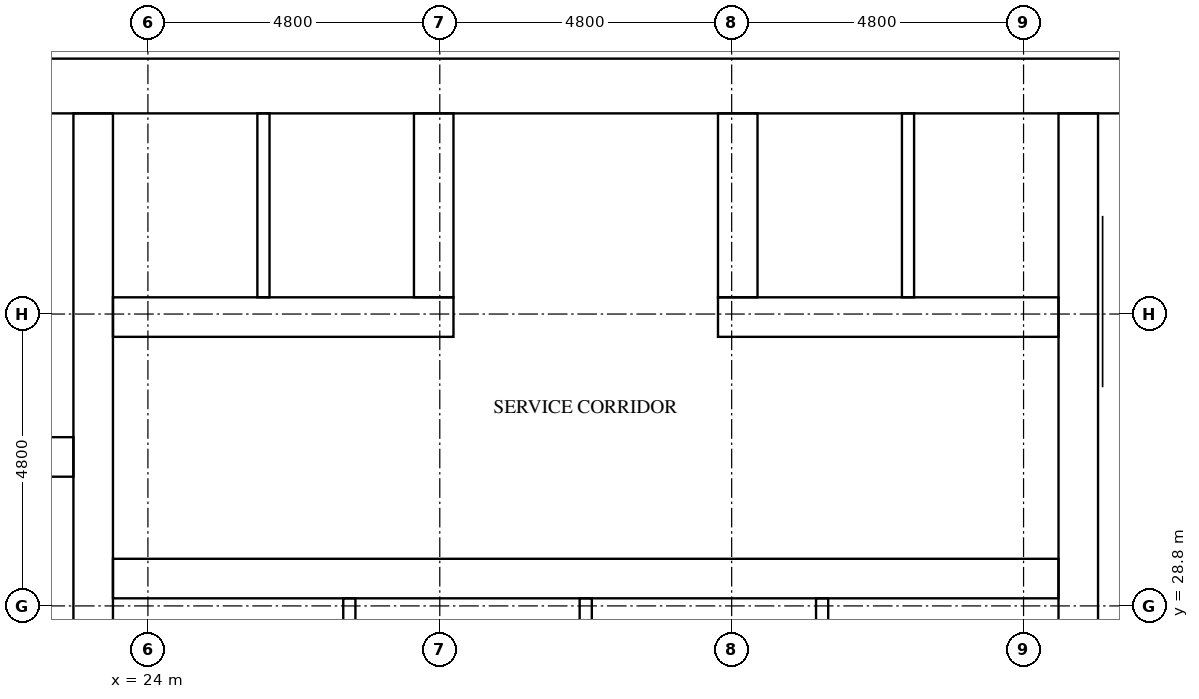
"""IFC4 building model, lengths in metres.
Left out: names, types, materials, properties, quantities, classifications, styles, units other than length and angle.
Written with IfcOpenShell. Run it as: python <this file> out.ifc"""

import sys

from ifc_helpers import new_model, si_unit, direction, frame, frame_2d, origin, place, context, subcontext, project, spatial, rectangle, extrude, element, fill, save


model = new_model("IFC4")
c1 = context("Model", 3, precision=1e-05, world=origin(), true_north=direction((0.0, 1.0)))
c2 = subcontext(c1, "Body", "Model", "MODEL_VIEW")
j1 = project(units=[si_unit("LENGTHUNIT", "METRE"), si_unit("PLANEANGLEUNIT", "RADIAN")], contexts=[c1])
p1 = place(None, origin())
s1 = spatial("IfcSite", under=j1, at=p1, CompositionType="ELEMENT")
p2 = place(p1, origin())
s2 = spatial("IfcBuilding", under=s1, at=p2, CompositionType="ELEMENT")
p3 = place(p2, frame((0.0, 0.0, 103.2)))
s3 = spatial("IfcBuildingStorey", under=s2, at=p3, CompositionType="ELEMENT", Elevation=103.2)
p4 = place(p3, frame((15.0, 37.35, 0.0), z_axis=(0.0, 0.0, 1.0), x_axis=(1.0, 0.0, 0.0)))
e1 = element("IfcWall", 1, at=p4, inside=s3, PredefinedType="SHEAR", context=c2, shape_type="SweptSolid", body=[
    extrude(rectangle(XDim=32.4, YDim=0.9, at=frame_2d((16.2, 0.0))), origin(), (0.0, 0.0, 1.0), 3.2),
])
p5 = place(p4, frame((15.3, 0.0, 0.0)))
e2 = element("IfcOpeningElement", 2, at=p5, cuts=e1, PredefinedType="OPENING", context=c2, shape_type="SweptSolid", body=[
    extrude(rectangle(XDim=1.8, YDim=2.1, at=frame_2d((0.9, 1.05))), frame((0.0, 0.46, 0.0), z_axis=(0.0, -1.0, 0.0), x_axis=(1.0, 0.0, 0.0)), (0.0, 0.0, 1.0), 0.92),
])
p6 = place(p4, frame((1.794, 0.0, 0.0)))
e3 = element("IfcOpeningElement", 3, at=p6, cuts=e1, PredefinedType="OPENING", context=c2, shape_type="SweptSolid", body=[
    extrude(rectangle(XDim=1.0, YDim=2.1, at=frame_2d((0.5, 1.05))), frame((0.0, 0.46, 0.0), z_axis=(0.0, -1.0, 0.0), x_axis=(1.0, 0.0, 0.0)), (0.0, 0.0, 1.0), 0.92),
])
p7 = place(p4, frame((5.331, 0.0, 0.0)))
e4 = element("IfcOpeningElement", 4, at=p7, cuts=e1, PredefinedType="OPENING", context=c2, shape_type="SweptSolid", body=[
    extrude(rectangle(XDim=1.0, YDim=2.1, at=frame_2d((0.5, 1.05))), frame((0.0, 0.46, 0.0), z_axis=(0.0, -1.0, 0.0), x_axis=(1.0, 0.0, 0.0)), (0.0, 0.0, 1.0), 0.92),
])
p8 = place(p3, frame((23.1, 15.9, 0.0), z_axis=(0.0, 0.0, 1.0), x_axis=(0.0, 1.0, 0.0)))
e5 = element("IfcWall", 5, at=p8, inside=s3, PredefinedType="SHEAR", context=c2, shape_type="SweptSolid", body=[
    extrude(rectangle(XDim=21.0, YDim=0.65, at=frame_2d((10.5, 0.0))), origin(), (0.0, 0.0, 1.0), 3.2),
])
p9 = place(p3, frame((39.3, 27.75, 0.0), z_axis=(0.0, 0.0, 1.0), x_axis=(0.0, 1.0, 0.0)))
e6 = element("IfcWall", 6, at=p9, inside=s3, PredefinedType="SHEAR", context=c2, shape_type="SweptSolid", body=[
    extrude(rectangle(XDim=9.15, YDim=0.65, at=frame_2d((4.575, 0.0))), origin(), (0.0, 0.0, 1.0), 3.2),
])
p10 = place(p3, frame((15.9, 31.25, 0.0), z_axis=(0.0, 0.0, 1.0), x_axis=(1.0, 0.0, 0.0)))
e7 = element("IfcWall", 7, at=p10, inside=s3, PredefinedType="SHEAR", context=c2, shape_type="SweptSolid", body=[
    extrude(rectangle(XDim=6.875, YDim=0.65, at=frame_2d((3.438, 0.0))), origin(), (0.0, 0.0, 1.0), 3.2),
])
p11 = place(p3, frame((23.425, 29.25, 0.0), z_axis=(0.0, 0.0, 1.0), x_axis=(1.0, 0.0, 0.0)))
e8 = element("IfcWall", 8, at=p11, inside=s3, PredefinedType="SHEAR", context=c2, shape_type="SweptSolid", body=[
    extrude(rectangle(XDim=15.55, YDim=0.65, at=frame_2d((7.775, 0.0))), origin(), (0.0, 0.0, 1.0), 3.2),
])
p12 = place(p11, frame((1.394, 0.0, 0.0)))
e9 = element("IfcOpeningElement", 9, at=p12, cuts=e8, PredefinedType="OPENING", context=c2, shape_type="SweptSolid", body=[
    extrude(rectangle(XDim=1.0, YDim=2.1, at=frame_2d((0.5, 1.05))), frame((0.0, 0.335, 0.0), z_axis=(0.0, -1.0, 0.0), x_axis=(1.0, 0.0, 0.0)), (0.0, 0.0, 1.0), 0.67),
])
p13 = place(p11, frame((5.331, 0.0, 0.0)))
e10 = element("IfcOpeningElement", 10, at=p13, cuts=e8, PredefinedType="OPENING", context=c2, shape_type="SweptSolid", body=[
    extrude(rectangle(XDim=1.0, YDim=2.1, at=frame_2d((0.5, 1.05))), frame((0.0, 0.335, 0.0), z_axis=(0.0, -1.0, 0.0), x_axis=(1.0, 0.0, 0.0)), (0.0, 0.0, 1.0), 0.67),
])
p14 = place(p11, frame((9.219, 0.0, 0.0)))
e11 = element("IfcOpeningElement", 11, at=p14, cuts=e8, PredefinedType="OPENING", context=c2, shape_type="SweptSolid", body=[
    extrude(rectangle(XDim=1.0, YDim=2.1, at=frame_2d((0.5, 1.05))), frame((0.0, 0.335, 0.0), z_axis=(0.0, -1.0, 0.0), x_axis=(1.0, 0.0, 0.0)), (0.0, 0.0, 1.0), 0.67),
])
p15 = place(p11, frame((13.156, 0.0, 0.0)))
e12 = element("IfcOpeningElement", 12, at=p15, cuts=e8, PredefinedType="OPENING", context=c2, shape_type="SweptSolid", body=[
    extrude(rectangle(XDim=1.0, YDim=2.1, at=frame_2d((0.5, 1.05))), frame((0.0, 0.335, 0.0), z_axis=(0.0, -1.0, 0.0), x_axis=(1.0, 0.0, 0.0)), (0.0, 0.0, 1.0), 0.67),
])
p16 = place(p3, frame((23.425, 33.55, 0.0), z_axis=(0.0, 0.0, 1.0), x_axis=(1.0, 0.0, 0.0)))
e13 = element("IfcWall", 13, at=p16, inside=s3, PredefinedType="SHEAR", context=c2, shape_type="SweptSolid", body=[
    extrude(rectangle(XDim=5.6, YDim=0.65, at=frame_2d((2.8, 0.0))), origin(), (0.0, 0.0, 1.0), 3.2),
])
p17 = place(p3, frame((33.375, 33.55, 0.0), z_axis=(0.0, 0.0, 1.0), x_axis=(1.0, 0.0, 0.0)))
e14 = element("IfcWall", 14, at=p17, inside=s3, PredefinedType="SHEAR", context=c2, shape_type="SweptSolid", body=[
    extrude(rectangle(XDim=5.6, YDim=0.65, at=frame_2d((2.8, 0.0))), origin(), (0.0, 0.0, 1.0), 3.2),
])
for number, where, z_axis, x_axis in (
    (15, (28.7, 33.875, 0.0), (0.0, 0.0, 1.0), (0.0, 1.0, 0.0)),
    (16, (33.7, 33.875, 0.0), (0.0, 0.0, 1.0), (0.0, 1.0, 0.0)),
):
    element("IfcWall", number, at=place(p3, frame(where, z_axis=z_axis, x_axis=x_axis)), inside=s3, PredefinedType="SHEAR", context=c2, shape_type="SweptSolid", body=[
        extrude(rectangle(XDim=3.025, YDim=0.65, at=frame_2d((1.512, 0.0))), origin(), (0.0, 0.0, 1.0), 3.2),
    ])
for number, where, z_axis, x_axis in (
    (17, (25.9, 33.875, 0.0), (0.0, 0.0, 1.0), (0.0, 1.0, 0.0)),
    (18, (36.5, 33.875, 0.0), (0.0, 0.0, 1.0), (0.0, 1.0, 0.0)),
):
    element("IfcWall", number, at=place(p3, frame(where, z_axis=z_axis, x_axis=x_axis)), inside=s3, PredefinedType="SOLIDWALL", context=c2, shape_type="SweptSolid", body=[
        extrude(rectangle(XDim=3.025, YDim=0.2, at=frame_2d((1.512, 0.0))), origin(), (0.0, 0.0, 1.0), 3.2),
    ])
for number, where, z_axis, x_axis in (
    (19, (27.312, 26.475, 0.0), (0.0, 0.0, 1.0), (0.0, 1.0, 0.0)),
    (20, (31.2, 26.475, 0.0), (0.0, 0.0, 1.0), (0.0, 1.0, 0.0)),
    (21, (35.087, 26.475, 0.0), (0.0, 0.0, 1.0), (0.0, 1.0, 0.0)),
):
    element("IfcWall", number, at=place(p3, frame(where, z_axis=z_axis, x_axis=x_axis)), inside=s3, PredefinedType="PARTITIONING", context=c2, shape_type="SweptSolid", body=[
        extrude(rectangle(XDim=2.45, YDim=0.2, at=frame_2d((1.225, 0.0))), origin(), (0.0, 0.0, 1.0), 3.2),
    ])
p18 = place(p5, origin())
e22 = element("IfcDoor", 22, at=p18, inside=s3, OperationType="DOUBLE_DOOR_SINGLE_SWING", PredefinedType="DOOR", context=c2, shape_type="SweptSolid", body=[
    extrude(rectangle(XDim=1.8, YDim=2.1, at=frame_2d((0.9, 1.05))), frame((0.0, 0.025, 0.0), z_axis=(0.0, -1.0, 0.0), x_axis=(1.0, 0.0, 0.0)), (0.0, 0.0, 1.0), 0.05),
])
fill(e2, e22)
p19 = place(p12, origin())
e23 = element("IfcDoor", 23, at=p19, inside=s3, OperationType="SINGLE_SWING_RIGHT", PredefinedType="DOOR", context=c2, shape_type="SweptSolid", body=[
    extrude(rectangle(XDim=1.0, YDim=2.1, at=frame_2d((0.5, 1.05))), frame((0.0, 0.025, 0.0), z_axis=(0.0, -1.0, 0.0), x_axis=(1.0, 0.0, 0.0)), (0.0, 0.0, 1.0), 0.05),
])
fill(e9, e23)
p20 = place(p13, origin())
e24 = element("IfcDoor", 24, at=p20, inside=s3, OperationType="SINGLE_SWING_LEFT", PredefinedType="DOOR", context=c2, shape_type="SweptSolid", body=[
    extrude(rectangle(XDim=1.0, YDim=2.1, at=frame_2d((0.5, 1.05))), frame((0.0, 0.025, 0.0), z_axis=(0.0, -1.0, 0.0), x_axis=(1.0, 0.0, 0.0)), (0.0, 0.0, 1.0), 0.05),
])
fill(e10, e24)
p21 = place(p14, origin())
e25 = element("IfcDoor", 25, at=p21, inside=s3, OperationType="SINGLE_SWING_RIGHT", PredefinedType="DOOR", context=c2, shape_type="SweptSolid", body=[
    extrude(rectangle(XDim=1.0, YDim=2.1, at=frame_2d((0.5, 1.05))), frame((0.0, 0.025, 0.0), z_axis=(0.0, -1.0, 0.0), x_axis=(1.0, 0.0, 0.0)), (0.0, 0.0, 1.0), 0.05),
])
fill(e11, e25)
p22 = place(p15, origin())
e26 = element("IfcDoor", 26, at=p22, inside=s3, OperationType="SINGLE_SWING_LEFT", PredefinedType="DOOR", context=c2, shape_type="SweptSolid", body=[
    extrude(rectangle(XDim=1.0, YDim=2.1, at=frame_2d((0.5, 1.05))), frame((0.0, 0.025, 0.0), z_axis=(0.0, -1.0, 0.0), x_axis=(1.0, 0.0, 0.0)), (0.0, 0.0, 1.0), 0.05),
])
fill(e12, e26)
save(model, sys.argv[1])
